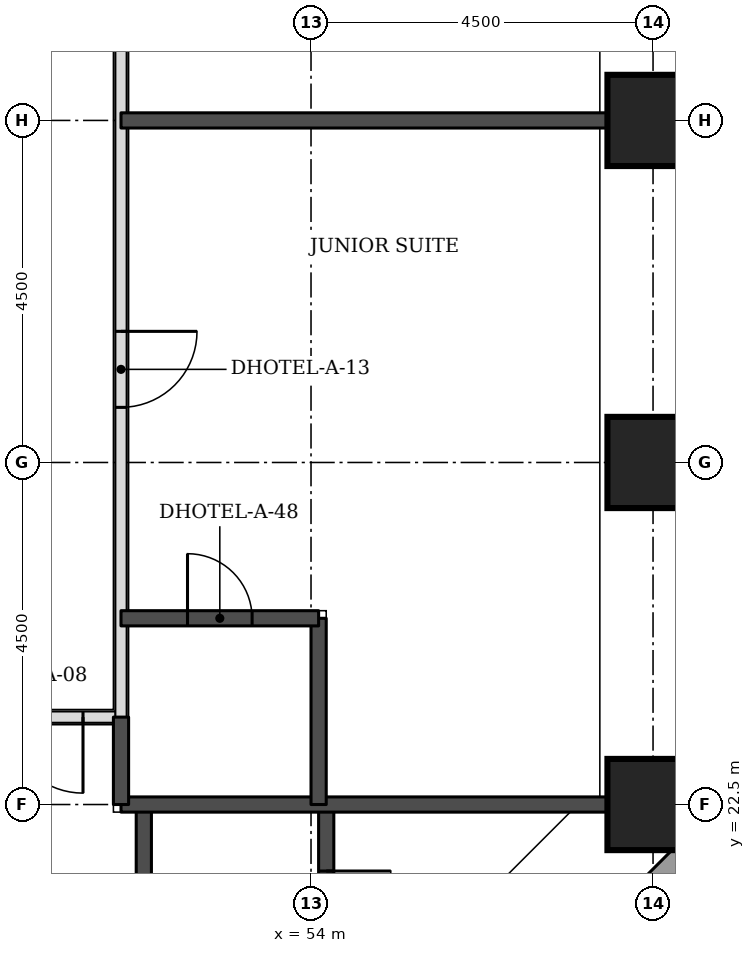
"""IFC4 building model, lengths in metres.
Left out: names, types, materials, properties, quantities, classifications, styles, units other than length and angle.
Written with IfcOpenShell. Run it as: python <this file> out.ifc"""

import sys

from ifc_helpers import new_model, si_unit, direction, frame, frame_2d, origin, origin_2d, place, context, subcontext, project, spatial, rectangle, extrude, element, fill, save


model = new_model("IFC4")
c1 = context("Model", 3, precision=1e-05, world=origin(), true_north=direction((0.0, 1.0)))
c2 = subcontext(c1, "Body", "Model", "MODEL_VIEW")
j1 = project(units=[si_unit("LENGTHUNIT", "METRE"), si_unit("PLANEANGLEUNIT", "RADIAN")], contexts=[c1])
p1 = place(None, origin())
s1 = spatial("IfcSite", under=j1, at=p1, CompositionType="ELEMENT")
p2 = place(p1, origin())
s2 = spatial("IfcBuilding", under=s1, at=p2, CompositionType="ELEMENT")
p3 = place(p2, frame((0.0, 0.0, 49.5)))
s3 = spatial("IfcBuildingStorey", under=s2, at=p3, CompositionType="ELEMENT", Elevation=49.5)
for number, where, z_axis, x_axis in (
    (1, (58.5, 22.5, 0.0), (0.0, 0.0, 1.0), (1.0, 0.0, 0.0)),
    (2, (58.5, 27.0, 0.0), (0.0, 0.0, 1.0), (1.0, 0.0, 0.0)),
    (3, (58.5, 31.5, 0.0), (0.0, 0.0, 1.0), (1.0, 0.0, 0.0)),
):
    element("IfcColumn", number, at=place(p3, frame(where, z_axis=z_axis, x_axis=x_axis)), inside=s3, PredefinedType="COLUMN", context=c2, shape_type="SweptSolid", body=[
        extrude(rectangle(XDim=1.2, YDim=1.2, at=origin_2d()), origin(), (0.0, 0.0, 1.0), 3.3),
    ])
p4 = place(p3, frame((54.27, 17.174, 0.0), z_axis=(0.0, 0.0, 1.0), x_axis=(0.707106781187, 0.707106781187, 0.0)))
e4 = element("IfcWall", 4, at=p4, inside=s3, PredefinedType="STANDARD", context=c2, shape_type="SweptSolid", body=[
    extrude(rectangle(XDim=7.151, YDim=0.35, at=frame_2d((3.576, 0.0))), origin(), (0.0, 0.0, 1.0), 3.055),
])
p5 = place(p4, frame((1.926, 0.0, 0.8)))
e5 = element("IfcOpeningElement", 5, at=p5, cuts=e4, PredefinedType="OPENING", context=c2, shape_type="SweptSolid", body=[
    extrude(rectangle(XDim=3.3, YDim=1.5, at=frame_2d((1.65, 0.75))), frame((0.0, 0.185, 0.0), z_axis=(0.0, -1.0, 0.0), x_axis=(1.0, 0.0, 0.0)), (0.0, 0.0, 1.0), 0.37),
])
p6 = place(p3, frame((19.15, 23.65, 0.0), z_axis=(0.0, 0.0, 1.0), x_axis=(1.0, 0.0, 0.0)))
e6 = element("IfcWall", 6, at=p6, inside=s3, PredefinedType="PARTITIONING", context=c2, shape_type="SweptSolid", body=[
    extrude(rectangle(XDim=32.35, YDim=0.15, at=frame_2d((16.175, 0.0))), origin(), (0.0, 0.0, 1.0), 3.08),
])
p7 = place(p6, frame((6.275, 0.0, 0.0)))
e7 = element("IfcOpeningElement", 7, at=p7, cuts=e6, PredefinedType="OPENING", context=c2, shape_type="SweptSolid", body=[
    extrude(rectangle(XDim=1.0, YDim=2.1, at=frame_2d((0.5, 1.05))), frame((0.0, 0.085, 0.0), z_axis=(0.0, -1.0, 0.0), x_axis=(1.0, 0.0, 0.0)), (0.0, 0.0, 1.0), 0.17),
])
p8 = place(p6, frame((8.675, 0.0, 0.0)))
e8 = element("IfcOpeningElement", 8, at=p8, cuts=e6, PredefinedType="OPENING", context=c2, shape_type="SweptSolid", body=[
    extrude(rectangle(XDim=1.0, YDim=2.1, at=frame_2d((0.5, 1.05))), frame((0.0, 0.085, 0.0), z_axis=(0.0, -1.0, 0.0), x_axis=(1.0, 0.0, 0.0)), (0.0, 0.0, 1.0), 0.17),
])
p9 = place(p6, frame((15.25, 0.0, 0.0)))
e9 = element("IfcOpeningElement", 9, at=p9, cuts=e6, PredefinedType="OPENING", context=c2, shape_type="SweptSolid", body=[
    extrude(rectangle(XDim=1.0, YDim=2.1, at=frame_2d((0.5, 1.05))), frame((0.0, 0.085, 0.0), z_axis=(0.0, -1.0, 0.0), x_axis=(1.0, 0.0, 0.0)), (0.0, 0.0, 1.0), 0.17),
])
p10 = place(p6, frame((17.675, 0.0, 0.0)))
e10 = element("IfcOpeningElement", 10, at=p10, cuts=e6, PredefinedType="OPENING", context=c2, shape_type="SweptSolid", body=[
    extrude(rectangle(XDim=1.0, YDim=2.1, at=frame_2d((0.5, 1.05))), frame((0.0, 0.085, 0.0), z_axis=(0.0, -1.0, 0.0), x_axis=(1.0, 0.0, 0.0)), (0.0, 0.0, 1.0), 0.17),
])
p11 = place(p6, frame((24.275, 0.0, 0.0)))
e11 = element("IfcOpeningElement", 11, at=p11, cuts=e6, PredefinedType="OPENING", context=c2, shape_type="SweptSolid", body=[
    extrude(rectangle(XDim=1.0, YDim=2.1, at=frame_2d((0.5, 1.05))), frame((0.0, 0.085, 0.0), z_axis=(0.0, -1.0, 0.0), x_axis=(1.0, 0.0, 0.0)), (0.0, 0.0, 1.0), 0.17),
])
p12 = place(p6, frame((26.675, 0.0, 0.0)))
e12 = element("IfcOpeningElement", 12, at=p12, cuts=e6, PredefinedType="OPENING", context=c2, shape_type="SweptSolid", body=[
    extrude(rectangle(XDim=1.0, YDim=2.1, at=frame_2d((0.5, 1.05))), frame((0.0, 0.085, 0.0), z_axis=(0.0, -1.0, 0.0), x_axis=(1.0, 0.0, 0.0)), (0.0, 0.0, 1.0), 0.17),
])
p13 = place(p6, frame((1.175, 0.0, 0.0)))
e13 = element("IfcOpeningElement", 13, at=p13, cuts=e6, PredefinedType="OPENING", context=c2, shape_type="SweptSolid", body=[
    extrude(rectangle(XDim=1.0, YDim=2.1, at=frame_2d((0.5, 1.05))), frame((0.0, 0.085, 0.0), z_axis=(0.0, -1.0, 0.0), x_axis=(1.0, 0.0, 0.0)), (0.0, 0.0, 1.0), 0.17),
])
p14 = place(p6, frame((30.85, 0.0, 0.0)))
e14 = element("IfcOpeningElement", 14, at=p14, cuts=e6, PredefinedType="OPENING", context=c2, shape_type="SweptSolid", body=[
    extrude(rectangle(XDim=1.0, YDim=2.1, at=frame_2d((0.5, 1.05))), frame((0.0, 0.085, 0.0), z_axis=(0.0, -1.0, 0.0), x_axis=(1.0, 0.0, 0.0)), (0.0, 0.0, 1.0), 0.17),
])
p15 = place(p3, frame((51.5, 23.65, 0.0), z_axis=(0.0, 0.0, 1.0), x_axis=(0.0, 1.0, 0.0)))
e15 = element("IfcWall", 15, at=p15, inside=s3, PredefinedType="PARTITIONING", context=c2, shape_type="SweptSolid", body=[
    extrude(rectangle(XDim=23.85, YDim=0.15, at=frame_2d((11.925, 0.0))), origin(), (0.0, 0.0, 1.0), 3.08),
])
p16 = place(p15, frame((4.075, 0.0, 0.0)))
e16 = element("IfcOpeningElement", 16, at=p16, cuts=e15, PredefinedType="OPENING", context=c2, shape_type="SweptSolid", body=[
    extrude(rectangle(XDim=1.0, YDim=2.1, at=frame_2d((0.5, 1.05))), frame((0.0, 0.085, 0.0), z_axis=(0.0, -1.0, 0.0), x_axis=(1.0, 0.0, 0.0)), (0.0, 0.0, 1.0), 0.17),
])
p17 = place(p15, frame((10.375, 0.0, 0.0)))
e17 = element("IfcOpeningElement", 17, at=p17, cuts=e15, PredefinedType="OPENING", context=c2, shape_type="SweptSolid", body=[
    extrude(rectangle(XDim=1.0, YDim=2.1, at=frame_2d((0.5, 1.05))), frame((0.0, 0.085, 0.0), z_axis=(0.0, -1.0, 0.0), x_axis=(1.0, 0.0, 0.0)), (0.0, 0.0, 1.0), 0.17),
])
p18 = place(p15, frame((19.9, 0.0, 0.0)))
e18 = element("IfcOpeningElement", 18, at=p18, cuts=e15, PredefinedType="OPENING", context=c2, shape_type="SweptSolid", body=[
    extrude(rectangle(XDim=0.9, YDim=2.1, at=frame_2d((0.45, 1.05))), frame((0.0, 0.085, 0.0), z_axis=(0.0, -1.0, 0.0), x_axis=(1.0, 0.0, 0.0)), (0.0, 0.0, 1.0), 0.17),
])
p19 = place(p3, frame((51.8, 20.0, 0.0), z_axis=(0.0, 0.0, 1.0), x_axis=(0.0, 1.0, 0.0)))
e19 = element("IfcWall", 19, at=p19, inside=s3, PredefinedType="SOLIDWALL", context=c2, shape_type="SweptSolid", body=[
    extrude(rectangle(XDim=2.5, YDim=0.2, at=frame_2d((1.25, 0.0))), origin(), (0.0, 0.0, 1.0), 3.08),
])
p20 = place(p3, frame((54.2, 20.0, 0.0), z_axis=(0.0, 0.0, 1.0), x_axis=(0.0, 1.0, 0.0)))
e20 = element("IfcWall", 20, at=p20, inside=s3, PredefinedType="SOLIDWALL", context=c2, shape_type="SweptSolid", body=[
    extrude(rectangle(XDim=2.5, YDim=0.2, at=frame_2d((1.25, 0.0))), origin(), (0.0, 0.0, 1.0), 3.08),
])
p21 = place(p20, frame((0.775, 0.0, 0.0)))
e21 = element("IfcOpeningElement", 21, at=p21, cuts=e20, PredefinedType="OPENING", context=c2, shape_type="SweptSolid", body=[
    extrude(rectangle(XDim=0.85, YDim=2.1, at=frame_2d((0.425, 1.05))), frame((0.0, 0.11, 0.0), z_axis=(0.0, -1.0, 0.0), x_axis=(1.0, 0.0, 0.0)), (0.0, 0.0, 1.0), 0.22),
])
p22 = place(p3, frame((51.5, 22.5, 0.0), z_axis=(0.0, 0.0, 1.0), x_axis=(1.0, 0.0, 0.0)))
e22 = element("IfcWall", 22, at=p22, inside=s3, PredefinedType="SOLIDWALL", context=c2, shape_type="SweptSolid", body=[
    extrude(rectangle(XDim=6.4, YDim=0.2, at=frame_2d((3.2, 0.0))), origin(), (0.0, 0.0, 1.0), 3.08),
])
p23 = place(p3, frame((51.5, 22.5, 0.0), z_axis=(0.0, 0.0, 1.0), x_axis=(0.0, 1.0, 0.0)))
e23 = element("IfcWall", 23, at=p23, inside=s3, PredefinedType="SOLIDWALL", context=c2, shape_type="SweptSolid", body=[
    extrude(rectangle(XDim=1.15, YDim=0.2, at=frame_2d((0.575, 0.0))), origin(), (0.0, 0.0, 1.0), 3.08),
])
p24 = place(p3, frame((54.1, 22.5, 0.0), z_axis=(0.0, 0.0, 1.0), x_axis=(0.0, 1.0, 0.0)))
e24 = element("IfcWall", 24, at=p24, inside=s3, PredefinedType="SOLIDWALL", context=c2, shape_type="SweptSolid", body=[
    extrude(rectangle(XDim=2.45, YDim=0.2, at=frame_2d((1.225, 0.0))), origin(), (0.0, 0.0, 1.0), 3.08),
])
p25 = place(p3, frame((51.5, 24.95, 0.0), z_axis=(0.0, 0.0, 1.0), x_axis=(1.0, 0.0, 0.0)))
e25 = element("IfcWall", 25, at=p25, inside=s3, PredefinedType="SOLIDWALL", context=c2, shape_type="SweptSolid", body=[
    extrude(rectangle(XDim=2.6, YDim=0.2, at=frame_2d((1.3, 0.0))), origin(), (0.0, 0.0, 1.0), 3.08),
])
p26 = place(p25, frame((0.875, 0.0, 0.0)))
e26 = element("IfcOpeningElement", 26, at=p26, cuts=e25, PredefinedType="OPENING", context=c2, shape_type="SweptSolid", body=[
    extrude(rectangle(XDim=0.85, YDim=2.1, at=frame_2d((0.425, 1.05))), frame((0.0, 0.11, 0.0), z_axis=(0.0, -1.0, 0.0), x_axis=(1.0, 0.0, 0.0)), (0.0, 0.0, 1.0), 0.22),
])
p27 = place(p3, frame((51.5, 31.5, 0.0), z_axis=(0.0, 0.0, 1.0), x_axis=(1.0, 0.0, 0.0)))
e27 = element("IfcWall", 27, at=p27, inside=s3, PredefinedType="SOLIDWALL", context=c2, shape_type="SweptSolid", body=[
    extrude(rectangle(XDim=6.4, YDim=0.2, at=frame_2d((3.2, 0.0))), origin(), (0.0, 0.0, 1.0), 3.08),
])
p28 = place(p16, frame((1.0, 0.0, 0.0), z_axis=(0.0, 0.0, 1.0), x_axis=(-1.0, 0.0, 0.0)))
e28 = element("IfcDoor", 28, at=p28, inside=s3, OperationType="SINGLE_SWING_LEFT", PredefinedType="DOOR", context=c2, shape_type="SweptSolid", body=[
    extrude(rectangle(XDim=1.0, YDim=2.1, at=frame_2d((0.5, 1.05))), frame((0.0, 0.025, 0.0), z_axis=(0.0, -1.0, 0.0), x_axis=(1.0, 0.0, 0.0)), (0.0, 0.0, 1.0), 0.05),
])
fill(e16, e28)
p29 = place(p26, origin())
e29 = element("IfcDoor", 29, at=p29, inside=s3, OperationType="SINGLE_SWING_LEFT", PredefinedType="DOOR", context=c2, shape_type="SweptSolid", body=[
    extrude(rectangle(XDim=0.85, YDim=2.1, at=frame_2d((0.425, 1.05))), frame((0.0, 0.025, 0.0), z_axis=(0.0, -1.0, 0.0), x_axis=(1.0, 0.0, 0.0)), (0.0, 0.0, 1.0), 0.05),
])
fill(e26, e29)
p30 = place(p14, frame((1.0, 0.0, 0.0), z_axis=(0.0, 0.0, 1.0), x_axis=(-1.0, 0.0, 0.0)))
e30 = element("IfcDoor", 30, at=p30, inside=s3, OperationType="SINGLE_SWING_LEFT", PredefinedType="DOOR", context=c2, shape_type="SweptSolid", body=[
    extrude(rectangle(XDim=1.0, YDim=2.1, at=frame_2d((0.5, 1.05))), frame((0.0, 0.025, 0.0), z_axis=(0.0, -1.0, 0.0), x_axis=(1.0, 0.0, 0.0)), (0.0, 0.0, 1.0), 0.05),
])
fill(e14, e30)
p31 = place(p21, frame((0.85, 0.0, 0.0), z_axis=(0.0, 0.0, 1.0), x_axis=(-1.0, 0.0, 0.0)))
e31 = element("IfcDoor", 31, at=p31, inside=s3, OperationType="SINGLE_SWING_LEFT", PredefinedType="DOOR", context=c2, shape_type="SweptSolid", body=[
    extrude(rectangle(XDim=0.85, YDim=2.1, at=frame_2d((0.425, 1.05))), frame((0.0, 0.025, 0.0), z_axis=(0.0, -1.0, 0.0), x_axis=(1.0, 0.0, 0.0)), (0.0, 0.0, 1.0), 0.05),
])
fill(e21, e31)
save(model, sys.argv[1])
